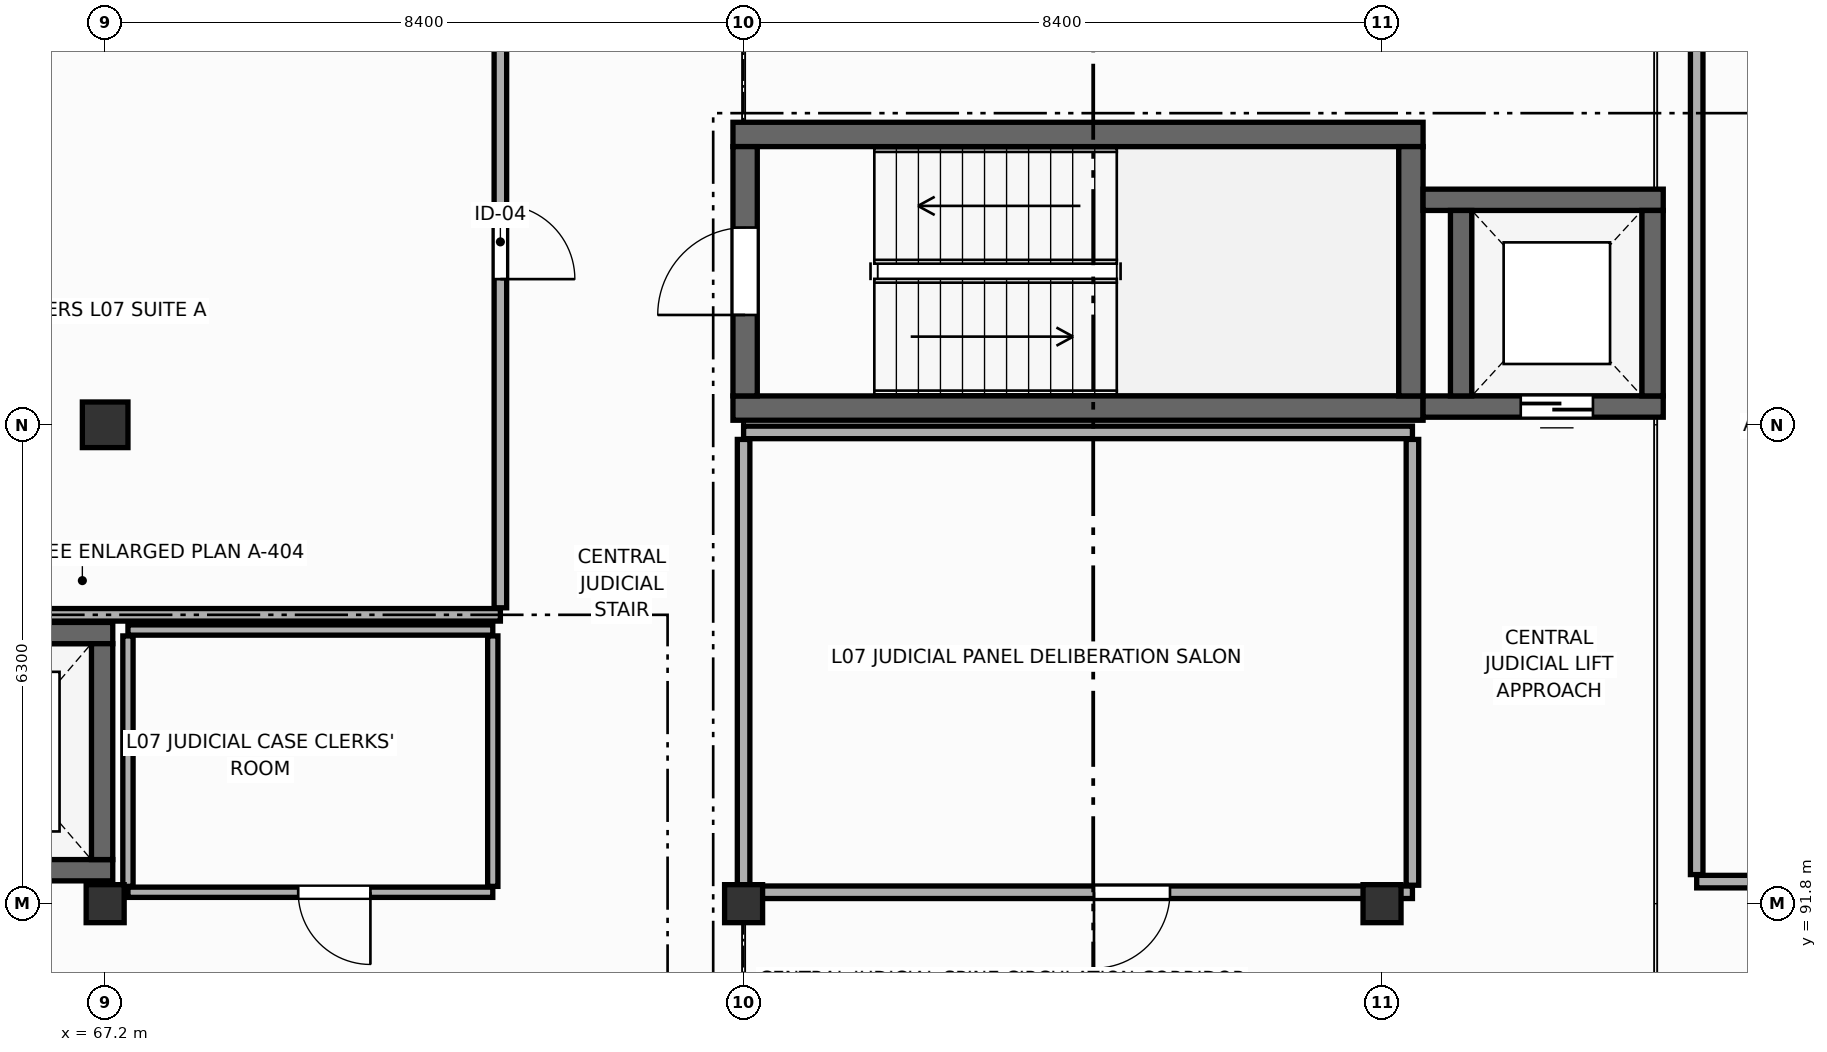
"""IFC4 building model, lengths in metres.
Left out: names, types, materials, properties, quantities, classifications, styles, units other than length and angle.
Written with IfcOpenShell. Run it as: python <this file> out.ifc"""

import sys

from ifc_helpers import new_model, si_unit, direction, frame, frame_2d, origin, origin_2d, place, context, subcontext, project, spatial, rectangle, extrude, element, fill, save


model = new_model("IFC4")
c1 = context("Model", 3, precision=1e-05, world=origin(), true_north=direction((0.0, 1.0)))
c2 = subcontext(c1, "Body", "Model", "MODEL_VIEW")
j1 = project(units=[si_unit("LENGTHUNIT", "METRE"), si_unit("PLANEANGLEUNIT", "RADIAN")], contexts=[c1])
p1 = place(None, origin())
s1 = spatial("IfcSite", under=j1, at=p1, CompositionType="ELEMENT")
p2 = place(p1, origin())
s2 = spatial("IfcBuilding", under=s1, at=p2, CompositionType="ELEMENT")
p3 = place(p2, frame((0.0, 0.0, 27.0)))
s3 = spatial("IfcBuildingStorey", under=s2, at=p3, CompositionType="ELEMENT", Elevation=27.0)
p4 = place(p3, frame((67.2, 91.8, 0.0), z_axis=(0.0, 0.0, 1.0), x_axis=(1.0, 0.0, 0.0)))
e1 = element("IfcColumn", 1, at=p4, inside=s3, PredefinedType="COLUMN", context=c2, shape_type="SweptSolid", body=[
    extrude(rectangle(XDim=0.5, YDim=0.5, at=origin_2d()), origin(), (0.0, 0.0, 1.0), 4.2),
])
p5 = place(p3, frame((67.2, 98.1, 0.0), z_axis=(0.0, 0.0, 1.0), x_axis=(1.0, 0.0, 0.0)))
e2 = element("IfcColumn", 2, at=p5, inside=s3, PredefinedType="COLUMN", context=c2, shape_type="SweptSolid", body=[
    extrude(rectangle(XDim=0.6, YDim=0.6, at=origin_2d()), origin(), (0.0, 0.0, 1.0), 4.2),
])
for number, where, z_axis, x_axis in (
    (3, (75.6, 91.8, 0.0), (0.0, 0.0, 1.0), (1.0, 0.0, 0.0)),
    (4, (84.0, 91.8, 0.0), (0.0, 0.0, 1.0), (1.0, 0.0, 0.0)),
):
    element("IfcColumn", number, at=place(p3, frame(where, z_axis=z_axis, x_axis=x_axis)), inside=s3, PredefinedType="COLUMN", context=c2, shape_type="SweptSolid", body=[
        extrude(rectangle(XDim=0.5, YDim=0.5, at=origin_2d()), origin(), (0.0, 0.0, 1.0), 4.2),
    ])
for number, where, z_axis, x_axis in (
    (5, (75.46, 101.92, 0.0), (0.0, 0.0, 1.0), (1.0, 0.0, 0.0)),
    (6, (84.54, 98.32, 0.0), (0.0, 0.0, 1.0), (-1.0, 0.0, 0.0)),
):
    element("IfcWall", number, at=place(p3, frame(where, z_axis=z_axis, x_axis=x_axis)), inside=s3, PredefinedType="SHEAR", context=c2, shape_type="SweptSolid", body=[
        extrude(rectangle(XDim=9.08, YDim=0.32, at=frame_2d((4.54, 0.0))), origin(), (0.0, 0.0, 1.0), 3.98),
    ])
p6 = place(p3, frame((75.62, 98.48, 0.0), z_axis=(0.0, 0.0, 1.0), x_axis=(0.0, 1.0, 0.0)))
e7 = element("IfcWall", 7, at=p6, inside=s3, PredefinedType="SHEAR", context=c2, shape_type="SweptSolid", body=[
    extrude(rectangle(XDim=3.28, YDim=0.32, at=frame_2d((1.64, 0.0))), origin(), (0.0, 0.0, 1.0), 3.98),
])
p7 = place(p6, frame((1.065, 0.0, 0.0)))
e8 = element("IfcOpeningElement", 8, at=p7, cuts=e7, PredefinedType="OPENING", context=c2, shape_type="SweptSolid", body=[
    extrude(rectangle(XDim=1.15, YDim=2.2, at=frame_2d((0.575, 1.1))), frame((0.0, 0.17, 0.0), z_axis=(0.0, -1.0, 0.0), x_axis=(1.0, 0.0, 0.0)), (0.0, 0.0, 1.0), 0.34),
])
p8 = place(p3, frame((84.38, 101.76, 0.0), z_axis=(0.0, 0.0, 1.0), x_axis=(0.0, -1.0, 0.0)))
e9 = element("IfcWall", 9, at=p8, inside=s3, PredefinedType="SHEAR", context=c2, shape_type="SweptSolid", body=[
    extrude(rectangle(XDim=3.28, YDim=0.32, at=frame_2d((1.64, 0.0))), origin(), (0.0, 0.0, 1.0), 3.98),
])
p9 = place(p3, frame((64.3, 95.36, 0.0), z_axis=(0.0, 0.0, 1.0), x_axis=(1.0, 0.0, 0.0)))
e10 = element("IfcWall", 10, at=p9, inside=s3, PredefinedType="SHEAR", context=c2, shape_type="SweptSolid", body=[
    extrude(rectangle(XDim=3.0, YDim=0.28, at=frame_2d((1.5, 0.0))), origin(), (0.0, 0.0, 1.0), 3.98),
])
p10 = place(p3, frame((67.3, 92.24, 0.0), z_axis=(0.0, 0.0, 1.0), x_axis=(-1.0, 0.0, 0.0)))
e11 = element("IfcWall", 11, at=p10, inside=s3, PredefinedType="SHEAR", context=c2, shape_type="SweptSolid", body=[
    extrude(rectangle(XDim=3.0, YDim=0.28, at=frame_2d((1.5, 0.0))), origin(), (0.0, 0.0, 1.0), 3.98),
])
p11 = place(p10, frame((0.975, 0.0, 0.0)))
e12 = element("IfcOpeningElement", 12, at=p11, cuts=e11, PredefinedType="OPENING", context=c2, shape_type="SweptSolid", body=[
    extrude(rectangle(XDim=1.05, YDim=2.2, at=frame_2d((0.525, 1.1))), frame((0.0, 0.15, 0.0), z_axis=(0.0, -1.0, 0.0), x_axis=(1.0, 0.0, 0.0)), (0.0, 0.0, 1.0), 0.3),
])
p12 = place(p3, frame((67.16, 95.22, 0.0), z_axis=(0.0, 0.0, 1.0), x_axis=(0.0, -1.0, 0.0)))
e13 = element("IfcWall", 13, at=p12, inside=s3, PredefinedType="SHEAR", context=c2, shape_type="SweptSolid", body=[
    extrude(rectangle(XDim=2.84, YDim=0.28, at=frame_2d((1.42, 0.0))), origin(), (0.0, 0.0, 1.0), 3.98),
])
p13 = place(p3, frame((84.54, 101.06, 0.0), z_axis=(0.0, 0.0, 1.0), x_axis=(1.0, 0.0, 0.0)))
e14 = element("IfcWall", 14, at=p13, inside=s3, PredefinedType="SHEAR", context=c2, shape_type="SweptSolid", body=[
    extrude(rectangle(XDim=3.16, YDim=0.28, at=frame_2d((1.58, 0.0))), origin(), (0.0, 0.0, 1.0), 3.98),
])
p14 = place(p3, frame((87.7, 98.34, 0.0), z_axis=(0.0, 0.0, 1.0), x_axis=(-1.0, 0.0, 0.0)))
e15 = element("IfcWall", 15, at=p14, inside=s3, PredefinedType="SHEAR", context=c2, shape_type="SweptSolid", body=[
    extrude(rectangle(XDim=3.16, YDim=0.28, at=frame_2d((1.58, 0.0))), origin(), (0.0, 0.0, 1.0), 3.98),
])
p15 = place(p14, frame((0.925, 0.0, 0.0)))
e16 = element("IfcOpeningElement", 16, at=p15, cuts=e15, PredefinedType="OPENING", context=c2, shape_type="SweptSolid", body=[
    extrude(rectangle(XDim=0.95, YDim=2.15, at=frame_2d((0.475, 1.075))), frame((0.0, 0.15, 0.0), z_axis=(0.0, -1.0, 0.0), x_axis=(1.0, 0.0, 0.0)), (0.0, 0.0, 1.0), 0.3),
])
for number, where, z_axis, x_axis in (
    (17, (85.04, 98.48, 0.0), (0.0, 0.0, 1.0), (0.0, 1.0, 0.0)),
    (18, (87.56, 100.92, 0.0), (0.0, 0.0, 1.0), (0.0, -1.0, 0.0)),
):
    element("IfcWall", number, at=place(p3, frame(where, z_axis=z_axis, x_axis=x_axis)), inside=s3, PredefinedType="SHEAR", context=c2, shape_type="SweptSolid", body=[
        extrude(rectangle(XDim=2.44, YDim=0.28, at=frame_2d((1.22, 0.0))), origin(), (0.0, 0.0, 1.0), 3.98),
    ])
p16 = place(p3, frame((72.4, 95.6, 0.0), z_axis=(0.0, 0.0, 1.0), x_axis=(-1.0, 0.0, 0.0)))
e19 = element("IfcWall", 19, at=p16, inside=s3, PredefinedType="PARTITIONING", context=c2, shape_type="SweptSolid", body=[
    extrude(rectangle(XDim=13.4, YDim=0.165, at=frame_2d((6.7, 0.0))), origin(), (0.0, 0.0, 1.0), 3.11),
])
p17 = place(p3, frame((72.4, 103.996, 0.0), z_axis=(0.0, 0.0, 1.0), x_axis=(0.0, -1.0, 0.0)))
e20 = element("IfcWall", 20, at=p17, inside=s3, PredefinedType="PARTITIONING", context=c2, shape_type="SweptSolid", body=[
    extrude(rectangle(XDim=8.304, YDim=0.165, at=frame_2d((4.152, 0.0))), origin(), (0.0, 0.0, 1.0), 3.965),
])
p18 = place(p17, frame((3.0, 0.0, 0.0)))
e21 = element("IfcOpeningElement", 21, at=p18, cuts=e20, PredefinedType="OPENING", context=c2, shape_type="SweptSolid", body=[
    extrude(rectangle(XDim=0.98, YDim=2.2, at=frame_2d((0.49, 1.1))), frame((0.0, 0.093, 0.0), z_axis=(0.0, -1.0, 0.0), x_axis=(1.0, 0.0, 0.0)), (0.0, 0.0, 1.0), 0.185),
])
p19 = place(p3, frame((67.5, 95.4, 0.0), z_axis=(0.0, 0.0, 1.0), x_axis=(1.0, 0.0, 0.0)))
e22 = element("IfcWall", 22, at=p19, inside=s3, PredefinedType="PARTITIONING", context=c2, shape_type="SweptSolid", body=[
    extrude(rectangle(XDim=4.8, YDim=0.135, at=frame_2d((2.4, 0.0))), origin(), (0.0, 0.0, 1.0), 3.51),
])
p20 = place(p3, frame((72.3, 91.95, 0.0), z_axis=(0.0, 0.0, 1.0), x_axis=(-1.0, 0.0, 0.0)))
e23 = element("IfcWall", 23, at=p20, inside=s3, PredefinedType="PARTITIONING", context=c2, shape_type="SweptSolid", body=[
    extrude(rectangle(XDim=4.8, YDim=0.135, at=frame_2d((2.4, 0.0))), origin(), (0.0, 0.0, 1.0), 3.41),
])
p21 = place(p20, frame((1.61, 0.0, 0.0)))
e24 = element("IfcOpeningElement", 24, at=p21, cuts=e23, PredefinedType="OPENING", context=c2, shape_type="SweptSolid", body=[
    extrude(rectangle(XDim=0.95, YDim=2.15, at=frame_2d((0.475, 1.075))), frame((0.0, 0.077, 0.0), z_axis=(0.0, -1.0, 0.0), x_axis=(1.0, 0.0, 0.0)), (0.0, 0.0, 1.0), 0.155),
])
for number, where, z_axis, x_axis in (
    (25, (67.5, 92.028, 0.0), (0.0, 0.0, 1.0), (0.0, 1.0, 0.0)),
    (26, (72.3, 95.323, 0.0), (0.0, 0.0, 1.0), (0.0, -1.0, 0.0)),
):
    element("IfcWall", number, at=place(p3, frame(where, z_axis=z_axis, x_axis=x_axis)), inside=s3, PredefinedType="PARTITIONING", context=c2, shape_type="SweptSolid", body=[
        extrude(rectangle(XDim=3.295, YDim=0.135, at=frame_2d((1.647, 0.0))), origin(), (0.0, 0.0, 1.0), 3.41),
    ])
p22 = place(p3, frame((75.6, 98.0, 0.0), z_axis=(0.0, 0.0, 1.0), x_axis=(1.0, 0.0, 0.0)))
e27 = element("IfcWall", 27, at=p22, inside=s3, PredefinedType="PARTITIONING", context=c2, shape_type="SweptSolid", body=[
    extrude(rectangle(XDim=8.8, YDim=0.165, at=frame_2d((4.4, 0.0))), origin(), (0.0, 0.0, 1.0), 3.11),
])
p23 = place(p3, frame((84.4, 91.95, 0.0), z_axis=(0.0, 0.0, 1.0), x_axis=(-1.0, 0.0, 0.0)))
e28 = element("IfcWall", 28, at=p23, inside=s3, PredefinedType="PARTITIONING", context=c2, shape_type="SweptSolid", body=[
    extrude(rectangle(XDim=8.8, YDim=0.165, at=frame_2d((4.4, 0.0))), origin(), (0.0, 0.0, 1.0), 3.11),
])
p24 = place(p23, frame((3.19, 0.0, 0.0)))
e29 = element("IfcOpeningElement", 29, at=p24, cuts=e28, PredefinedType="OPENING", context=c2, shape_type="SweptSolid", body=[
    extrude(rectangle(XDim=1.0, YDim=2.15, at=frame_2d((0.5, 1.075))), frame((0.0, 0.093, 0.0), z_axis=(0.0, -1.0, 0.0), x_axis=(1.0, 0.0, 0.0)), (0.0, 0.0, 1.0), 0.185),
])
for number, where, z_axis, x_axis in (
    (30, (75.6, 92.042, 0.0), (0.0, 0.0, 1.0), (0.0, 1.0, 0.0)),
    (31, (84.4, 97.907, 0.0), (0.0, 0.0, 1.0), (0.0, -1.0, 0.0)),
):
    element("IfcWall", number, at=place(p3, frame(where, z_axis=z_axis, x_axis=x_axis)), inside=s3, PredefinedType="PARTITIONING", context=c2, shape_type="SweptSolid", body=[
        extrude(rectangle(XDim=5.865, YDim=0.165, at=frame_2d((2.933, 0.0))), origin(), (0.0, 0.0, 1.0), 3.11),
    ])
p25 = place(p3, frame((94.76, 92.09, 0.0), z_axis=(0.0, 0.0, 1.0), x_axis=(-1.0, 0.0, 0.0)))
e32 = element("IfcWall", 32, at=p25, inside=s3, PredefinedType="PARTITIONING", context=c2, shape_type="SweptSolid", body=[
    extrude(rectangle(XDim=6.62, YDim=0.165, at=frame_2d((3.31, 0.0))), origin(), (0.0, 0.0, 1.0), 3.31),
])
p26 = place(p25, frame((4.055, 0.0, 0.0)))
e33 = element("IfcOpeningElement", 33, at=p26, cuts=e32, PredefinedType="OPENING", context=c2, shape_type="SweptSolid", body=[
    extrude(rectangle(XDim=0.98, YDim=2.2, at=frame_2d((0.49, 1.1))), frame((0.0, 0.093, 0.0), z_axis=(0.0, -1.0, 0.0), x_axis=(1.0, 0.0, 0.0)), (0.0, 0.0, 1.0), 0.185),
])
p27 = place(p3, frame((88.14, 92.183, 0.0), z_axis=(0.0, 0.0, 1.0), x_axis=(0.0, 1.0, 0.0)))
e34 = element("IfcWall", 34, at=p27, inside=s3, PredefinedType="PARTITIONING", context=c2, shape_type="SweptSolid", body=[
    extrude(rectangle(XDim=11.813, YDim=0.165, at=frame_2d((5.907, 0.0))), origin(), (0.0, 0.0, 1.0), 3.41),
])
p28 = place(p7, origin())
e35 = element("IfcDoor", 35, at=p28, inside=s3, OperationType="SINGLE_SWING_LEFT", PredefinedType="DOOR", context=c2, shape_type="SweptSolid", body=[
    extrude(rectangle(XDim=1.15, YDim=2.2, at=frame_2d((0.575, 1.1))), frame((0.0, 0.025, 0.0), z_axis=(0.0, -1.0, 0.0), x_axis=(1.0, 0.0, 0.0)), (0.0, 0.0, 1.0), 0.05),
])
fill(e8, e35)
p29 = place(p15, origin())
e36 = element("IfcDoor", 36, at=p29, inside=s3, OperationType="DOUBLE_DOOR_SLIDING", PredefinedType="DOOR", context=c2, shape_type="SweptSolid", body=[
    extrude(rectangle(XDim=0.95, YDim=2.15, at=frame_2d((0.475, 1.075))), frame((0.0, 0.025, 0.0), z_axis=(0.0, -1.0, 0.0), x_axis=(1.0, 0.0, 0.0)), (0.0, 0.0, 1.0), 0.05),
])
fill(e16, e36)
p30 = place(p18, origin())
e37 = element("IfcDoor", 37, at=p30, inside=s3, OperationType="SINGLE_SWING_RIGHT", PredefinedType="DOOR", context=c2, shape_type="SweptSolid", body=[
    extrude(rectangle(XDim=0.98, YDim=2.2, at=frame_2d((0.49, 1.1))), frame((0.0, 0.025, 0.0), z_axis=(0.0, -1.0, 0.0), x_axis=(1.0, 0.0, 0.0)), (0.0, 0.0, 1.0), 0.05),
])
fill(e21, e37)
p31 = place(p21, origin())
e38 = element("IfcDoor", 38, at=p31, inside=s3, OperationType="SINGLE_SWING_LEFT", PredefinedType="DOOR", context=c2, shape_type="SweptSolid", body=[
    extrude(rectangle(XDim=0.95, YDim=2.15, at=frame_2d((0.475, 1.075))), frame((0.0, 0.025, 0.0), z_axis=(0.0, -1.0, 0.0), x_axis=(1.0, 0.0, 0.0)), (0.0, 0.0, 1.0), 0.05),
])
fill(e24, e38)
p32 = place(p24, origin())
e39 = element("IfcDoor", 39, at=p32, inside=s3, OperationType="SINGLE_SWING_RIGHT", PredefinedType="DOOR", context=c2, shape_type="SweptSolid", body=[
    extrude(rectangle(XDim=1.0, YDim=2.15, at=frame_2d((0.5, 1.075))), frame((0.0, 0.025, 0.0), z_axis=(0.0, -1.0, 0.0), x_axis=(1.0, 0.0, 0.0)), (0.0, 0.0, 1.0), 0.05),
])
fill(e29, e39)
save(model, sys.argv[1])
